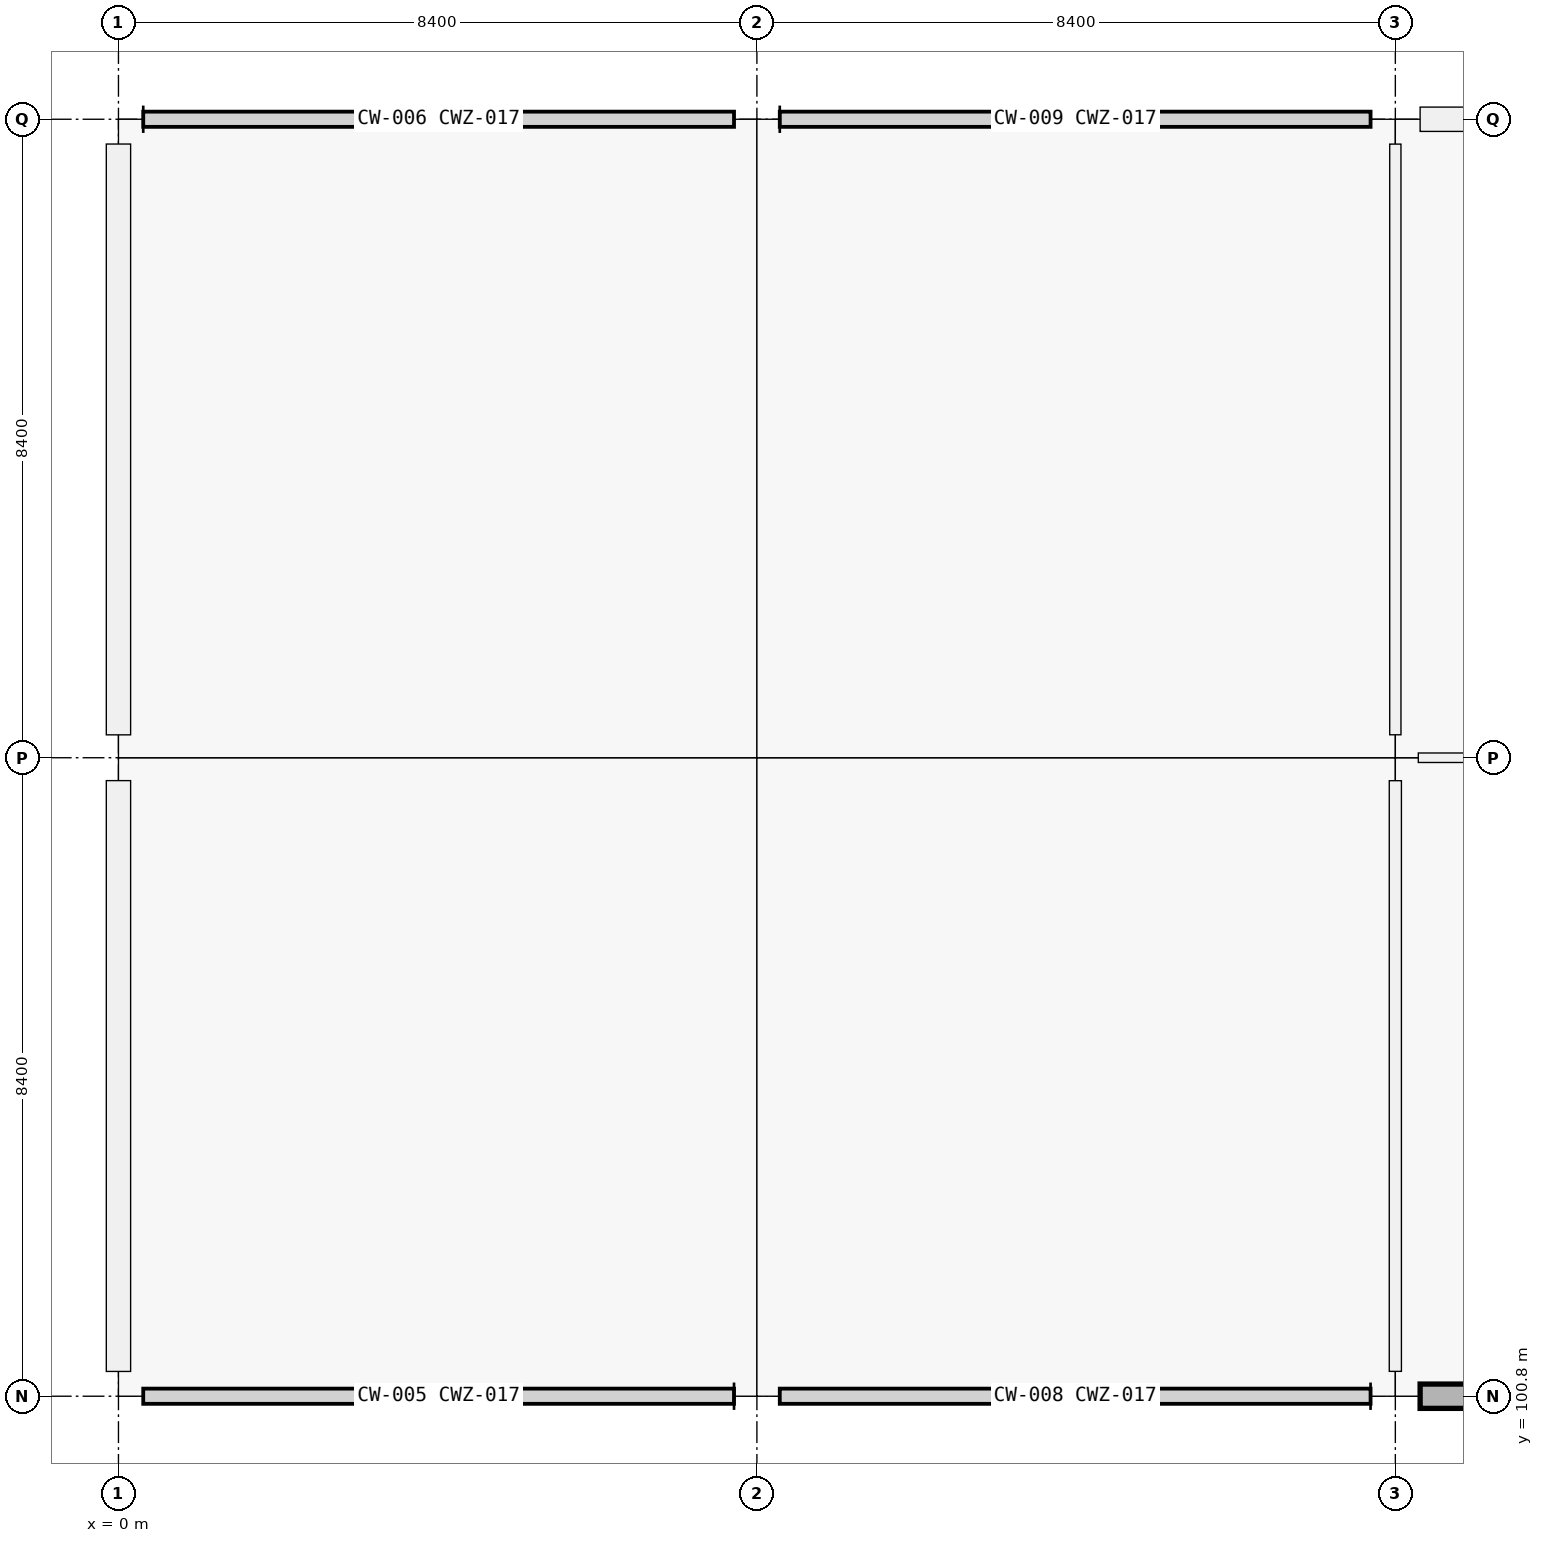
"""IFC4 building model, lengths in metres.
Left out: names, types, materials, properties, quantities, classifications, styles, units other than length and angle.
Written with IfcOpenShell. Run it as: python <this file> out.ifc"""

import sys

from ifc_helpers import new_model, si_unit, direction, frame, frame_2d, origin, origin_2d, place, context, subcontext, project, spatial, rectangle, extrude, element, fill, save


model = new_model("IFC4")
c1 = context("Model", 3, precision=1e-05, world=origin(), true_north=direction((0.0, 1.0)))
c2 = subcontext(c1, "Body", "Model", "MODEL_VIEW")
j1 = project(units=[si_unit("LENGTHUNIT", "METRE"), si_unit("PLANEANGLEUNIT", "RADIAN")], contexts=[c1])
p1 = place(None, origin())
s1 = spatial("IfcSite", under=j1, at=p1, CompositionType="ELEMENT")
p2 = place(p1, origin())
s2 = spatial("IfcBuilding", under=s1, at=p2, CompositionType="ELEMENT")
p3 = place(p2, origin())
s3 = spatial("IfcBuildingStorey", under=s2, at=p3, CompositionType="ELEMENT", Elevation=0.0)
p4 = place(p3, frame((0.0, 100.8, 0.0), z_axis=(0.0, 0.0, 1.0), x_axis=(1.0, 0.0, 0.0)))
e1 = element("IfcColumn", 1, at=p4, inside=s3, PredefinedType="COLUMN", context=c2, shape_type="SweptSolid", body=[
    extrude(rectangle(XDim=0.65, YDim=0.65, at=origin_2d()), origin(), (0.0, 0.0, 1.0), 5.76),
])
p5 = place(p3, frame((0.0, 109.2, 0.0), z_axis=(0.0, 0.0, 1.0), x_axis=(1.0, 0.0, 0.0)))
e2 = element("IfcColumn", 2, at=p5, inside=s3, PredefinedType="COLUMN", context=c2, shape_type="SweptSolid", body=[
    extrude(rectangle(XDim=0.6, YDim=0.6, at=origin_2d()), origin(), (0.0, 0.0, 1.0), 5.76),
])
p6 = place(p3, frame((0.0, 117.6, 0.0), z_axis=(0.0, 0.0, 1.0), x_axis=(1.0, 0.0, 0.0)))
e3 = element("IfcColumn", 3, at=p6, inside=s3, PredefinedType="COLUMN", context=c2, shape_type="SweptSolid", body=[
    extrude(rectangle(XDim=0.65, YDim=0.65, at=origin_2d()), origin(), (0.0, 0.0, 1.0), 5.76),
])
p7 = place(p3, frame((8.4, 100.8, 0.0), z_axis=(0.0, 0.0, 1.0), x_axis=(1.0, 0.0, 0.0)))
e4 = element("IfcColumn", 4, at=p7, inside=s3, PredefinedType="COLUMN", context=c2, shape_type="SweptSolid", body=[
    extrude(rectangle(XDim=0.6, YDim=0.6, at=origin_2d()), origin(), (0.0, 0.0, 1.0), 5.76),
])
p8 = place(p3, frame((8.4, 109.2, 0.0), z_axis=(0.0, 0.0, 1.0), x_axis=(1.0, 0.0, 0.0)))
e5 = element("IfcColumn", 5, at=p8, inside=s3, PredefinedType="COLUMN", context=c2, shape_type="SweptSolid", body=[
    extrude(rectangle(XDim=0.65, YDim=0.65, at=origin_2d()), origin(), (0.0, 0.0, 1.0), 5.76),
])
p9 = place(p3, frame((8.4, 117.6, 0.0), z_axis=(0.0, 0.0, 1.0), x_axis=(1.0, 0.0, 0.0)))
e6 = element("IfcColumn", 6, at=p9, inside=s3, PredefinedType="COLUMN", context=c2, shape_type="SweptSolid", body=[
    extrude(rectangle(XDim=0.6, YDim=0.6, at=origin_2d()), origin(), (0.0, 0.0, 1.0), 5.76),
])
p10 = place(p3, frame((16.8, 100.8, 0.0), z_axis=(0.0, 0.0, 1.0), x_axis=(1.0, 0.0, 0.0)))
e7 = element("IfcColumn", 7, at=p10, inside=s3, PredefinedType="COLUMN", context=c2, shape_type="SweptSolid", body=[
    extrude(rectangle(XDim=0.65, YDim=0.65, at=origin_2d()), origin(), (0.0, 0.0, 1.0), 5.76),
])
p11 = place(p3, frame((16.8, 109.2, 0.0), z_axis=(0.0, 0.0, 1.0), x_axis=(1.0, 0.0, 0.0)))
e8 = element("IfcColumn", 8, at=p11, inside=s3, PredefinedType="COLUMN", context=c2, shape_type="SweptSolid", body=[
    extrude(rectangle(XDim=0.6, YDim=0.6, at=origin_2d()), origin(), (0.0, 0.0, 1.0), 5.76),
])
p12 = place(p3, frame((16.8, 117.6, 0.0), z_axis=(0.0, 0.0, 1.0), x_axis=(1.0, 0.0, 0.0)))
e9 = element("IfcColumn", 9, at=p12, inside=s3, PredefinedType="COLUMN", context=c2, shape_type="SweptSolid", body=[
    extrude(rectangle(XDim=0.65, YDim=0.65, at=origin_2d()), origin(), (0.0, 0.0, 1.0), 5.76),
])
p13 = place(p3, frame((0.0, 101.126, 0.0), z_axis=(0.0, 0.0, 1.0), x_axis=(0.0, 1.0, 0.0)))
e10 = element("IfcWall", 10, at=p13, inside=s3, PredefinedType="SOLIDWALL", context=c2, shape_type="SweptSolid", body=[
    extrude(rectangle(XDim=7.773, YDim=0.32, at=frame_2d((3.886, 0.0))), origin(), (0.0, 0.0, 1.0), 4.7),
])
p14 = place(p13, frame((2.886, 0.0, 0.9)))
e11 = element("IfcOpeningElement", 11, at=p14, cuts=e10, PredefinedType="OPENING", context=c2, shape_type="SweptSolid", body=[
    extrude(rectangle(XDim=2.0, YDim=2.1, at=frame_2d((1.0, 1.05))), frame((0.0, 0.16, 0.0), z_axis=(0.0, -1.0, 0.0), x_axis=(1.0, 0.0, 0.0)), (0.0, 0.0, 1.0), 0.32),
])
p15 = place(p3, frame((0.0, 109.501, 0.0), z_axis=(0.0, 0.0, 1.0), x_axis=(0.0, 1.0, 0.0)))
e12 = element("IfcWall", 12, at=p15, inside=s3, PredefinedType="SOLIDWALL", context=c2, shape_type="SweptSolid", body=[
    extrude(rectangle(XDim=7.773, YDim=0.32, at=frame_2d((3.886, 0.0))), origin(), (0.0, 0.0, 1.0), 4.7),
])
p16 = place(p15, frame((2.087, 0.0, 0.0)))
e13 = element("IfcOpeningElement", 13, at=p16, cuts=e12, PredefinedType="OPENING", context=c2, shape_type="SweptSolid", body=[
    extrude(rectangle(XDim=3.6, YDim=3.6, at=frame_2d((1.8, 1.8))), frame((0.0, 0.16, 0.0), z_axis=(0.0, -1.0, 0.0), x_axis=(1.0, 0.0, 0.0)), (0.0, 0.0, 1.0), 0.32),
])
p17 = place(p3, frame((24.799, 100.8, 0.0), z_axis=(0.0, 0.0, 1.0), x_axis=(-1.0, 0.0, 0.0)))
e14 = element("IfcWall", 14, at=p17, inside=s3, PredefinedType="SOLIDWALL", context=c2, shape_type="SweptSolid", body=[
    extrude(rectangle(XDim=7.673, YDim=0.32, at=frame_2d((3.836, 0.0))), origin(), (0.0, 0.0, 1.0), 4.7),
])
p18 = place(p17, frame((3.236, 0.0, 0.9)))
e15 = element("IfcOpeningElement", 15, at=p18, cuts=e14, PredefinedType="OPENING", context=c2, shape_type="SweptSolid", body=[
    extrude(rectangle(XDim=1.2, YDim=2.1, at=frame_2d((0.6, 1.05))), frame((0.0, 0.16, 0.0), z_axis=(0.0, -1.0, 0.0), x_axis=(1.0, 0.0, 0.0)), (0.0, 0.0, 1.0), 0.32),
])
p19 = place(p3, frame((17.126, 117.6, 0.0), z_axis=(0.0, 0.0, 1.0), x_axis=(1.0, 0.0, 0.0)))
e16 = element("IfcWall", 16, at=p19, inside=s3, PredefinedType="SOLIDWALL", context=c2, shape_type="SweptSolid", body=[
    extrude(rectangle(XDim=7.673, YDim=0.32, at=frame_2d((3.836, 0.0))), origin(), (0.0, 0.0, 1.0), 4.7),
])
p20 = place(p19, frame((2.337, 0.0, 0.9)))
e17 = element("IfcOpeningElement", 17, at=p20, cuts=e16, PredefinedType="OPENING", context=c2, shape_type="SweptSolid", body=[
    extrude(rectangle(XDim=3.0, YDim=1.2, at=frame_2d((1.5, 0.6))), frame((0.0, 0.16, 0.0), z_axis=(0.0, -1.0, 0.0), x_axis=(1.0, 0.0, 0.0)), (0.0, 0.0, 1.0), 0.32),
])
p21 = place(p3, frame((17.102, 109.2, 0.0), z_axis=(0.0, 0.0, 1.0), x_axis=(1.0, 0.0, 0.0)))
e18 = element("IfcWall", 18, at=p21, inside=s3, PredefinedType="PARTITIONING", context=c2, shape_type="SweptSolid", body=[
    extrude(rectangle(XDim=7.696, YDim=0.125, at=frame_2d((3.848, 0.0))), origin(), (0.0, 0.0, 1.0), 3.66),
])
p22 = place(p21, frame((3.368, 0.0, 0.0)))
e19 = element("IfcOpeningElement", 19, at=p22, cuts=e18, PredefinedType="OPENING", context=c2, shape_type="SweptSolid", body=[
    extrude(rectangle(XDim=0.96, YDim=2.18, at=frame_2d((0.48, 1.09))), frame((0.0, 0.062, 0.0), z_axis=(0.0, -1.0, 0.0), x_axis=(1.0, 0.0, 0.0)), (0.0, 0.0, 1.0), 0.125),
])
p23 = place(p3, frame((16.8, 101.127, 0.0), z_axis=(0.0, 0.0, 1.0), x_axis=(0.0, 1.0, 0.0)))
e20 = element("IfcWall", 20, at=p23, inside=s3, PredefinedType="PARTITIONING", context=c2, shape_type="SweptSolid", body=[
    extrude(rectangle(XDim=7.771, YDim=0.16, at=frame_2d((3.885, 0.0))), origin(), (0.0, 0.0, 1.0), 3.66),
])
p24 = place(p23, frame((3.435, 0.0, 0.0)))
e21 = element("IfcOpeningElement", 21, at=p24, cuts=e20, PredefinedType="OPENING", context=c2, shape_type="SweptSolid", body=[
    extrude(rectangle(XDim=0.9, YDim=2.05, at=frame_2d((0.45, 1.025))), frame((0.0, 0.08, 0.0), z_axis=(0.0, -1.0, 0.0), x_axis=(1.0, 0.0, 0.0)), (0.0, 0.0, 1.0), 0.16),
])
p25 = place(p3, frame((16.8, 109.502, 0.0), z_axis=(0.0, 0.0, 1.0), x_axis=(0.0, 1.0, 0.0)))
e22 = element("IfcWall", 22, at=p25, inside=s3, PredefinedType="PARTITIONING", context=c2, shape_type="SweptSolid", body=[
    extrude(rectangle(XDim=7.771, YDim=0.148, at=frame_2d((3.885, 0.0))), origin(), (0.0, 0.0, 1.0), 3.66),
])
p26 = place(p25, frame((3.085, 0.0, 0.0)))
e23 = element("IfcOpeningElement", 23, at=p26, cuts=e22, PredefinedType="OPENING", context=c2, shape_type="SweptSolid", body=[
    extrude(rectangle(XDim=1.6, YDim=2.2, at=frame_2d((0.8, 1.1))), frame((0.0, 0.074, 0.0), z_axis=(0.0, -1.0, 0.0), x_axis=(1.0, 0.0, 0.0)), (0.0, 0.0, 1.0), 0.148),
])
p27 = place(p14, origin())
e24 = element("IfcWindow", 24, at=p27, inside=s3, PartitioningType="SINGLE_PANEL", PredefinedType="WINDOW", context=c2, shape_type="SweptSolid", body=[
    extrude(rectangle(XDim=2.0, YDim=2.1, at=frame_2d((1.0, 1.05))), frame((0.0, 0.03, 0.0), z_axis=(0.0, -1.0, 0.0), x_axis=(1.0, 0.0, 0.0)), (0.0, 0.0, 1.0), 0.06),
])
fill(e11, e24)
p28 = place(p16, origin())
e25 = element("IfcDoor", 25, at=p28, inside=s3, OperationType="ROLLINGUP", PredefinedType="DOOR", context=c2, shape_type="SweptSolid", body=[
    extrude(rectangle(XDim=3.6, YDim=3.6, at=frame_2d((1.8, 1.8))), frame((0.0, 0.025, 0.0), z_axis=(0.0, -1.0, 0.0), x_axis=(1.0, 0.0, 0.0)), (0.0, 0.0, 1.0), 0.05),
])
fill(e13, e25)
p29 = place(p24, origin())
e26 = element("IfcDoor", 26, at=p29, inside=s3, OperationType="SINGLE_SWING_RIGHT", PredefinedType="DOOR", context=c2, shape_type="SweptSolid", body=[
    extrude(rectangle(XDim=0.9, YDim=2.05, at=frame_2d((0.45, 1.025))), frame((0.0, 0.025, 0.0), z_axis=(0.0, -1.0, 0.0), x_axis=(1.0, 0.0, 0.0)), (0.0, 0.0, 1.0), 0.05),
])
fill(e21, e26)
p30 = place(p26, origin())
e27 = element("IfcDoor", 27, at=p30, inside=s3, OperationType="DOUBLE_DOOR_SINGLE_SWING", PredefinedType="DOOR", context=c2, shape_type="SweptSolid", body=[
    extrude(rectangle(XDim=1.6, YDim=2.2, at=frame_2d((0.8, 1.1))), frame((0.0, 0.025, 0.0), z_axis=(0.0, -1.0, 0.0), x_axis=(1.0, 0.0, 0.0)), (0.0, 0.0, 1.0), 0.05),
])
fill(e23, e27)
save(model, sys.argv[1])
